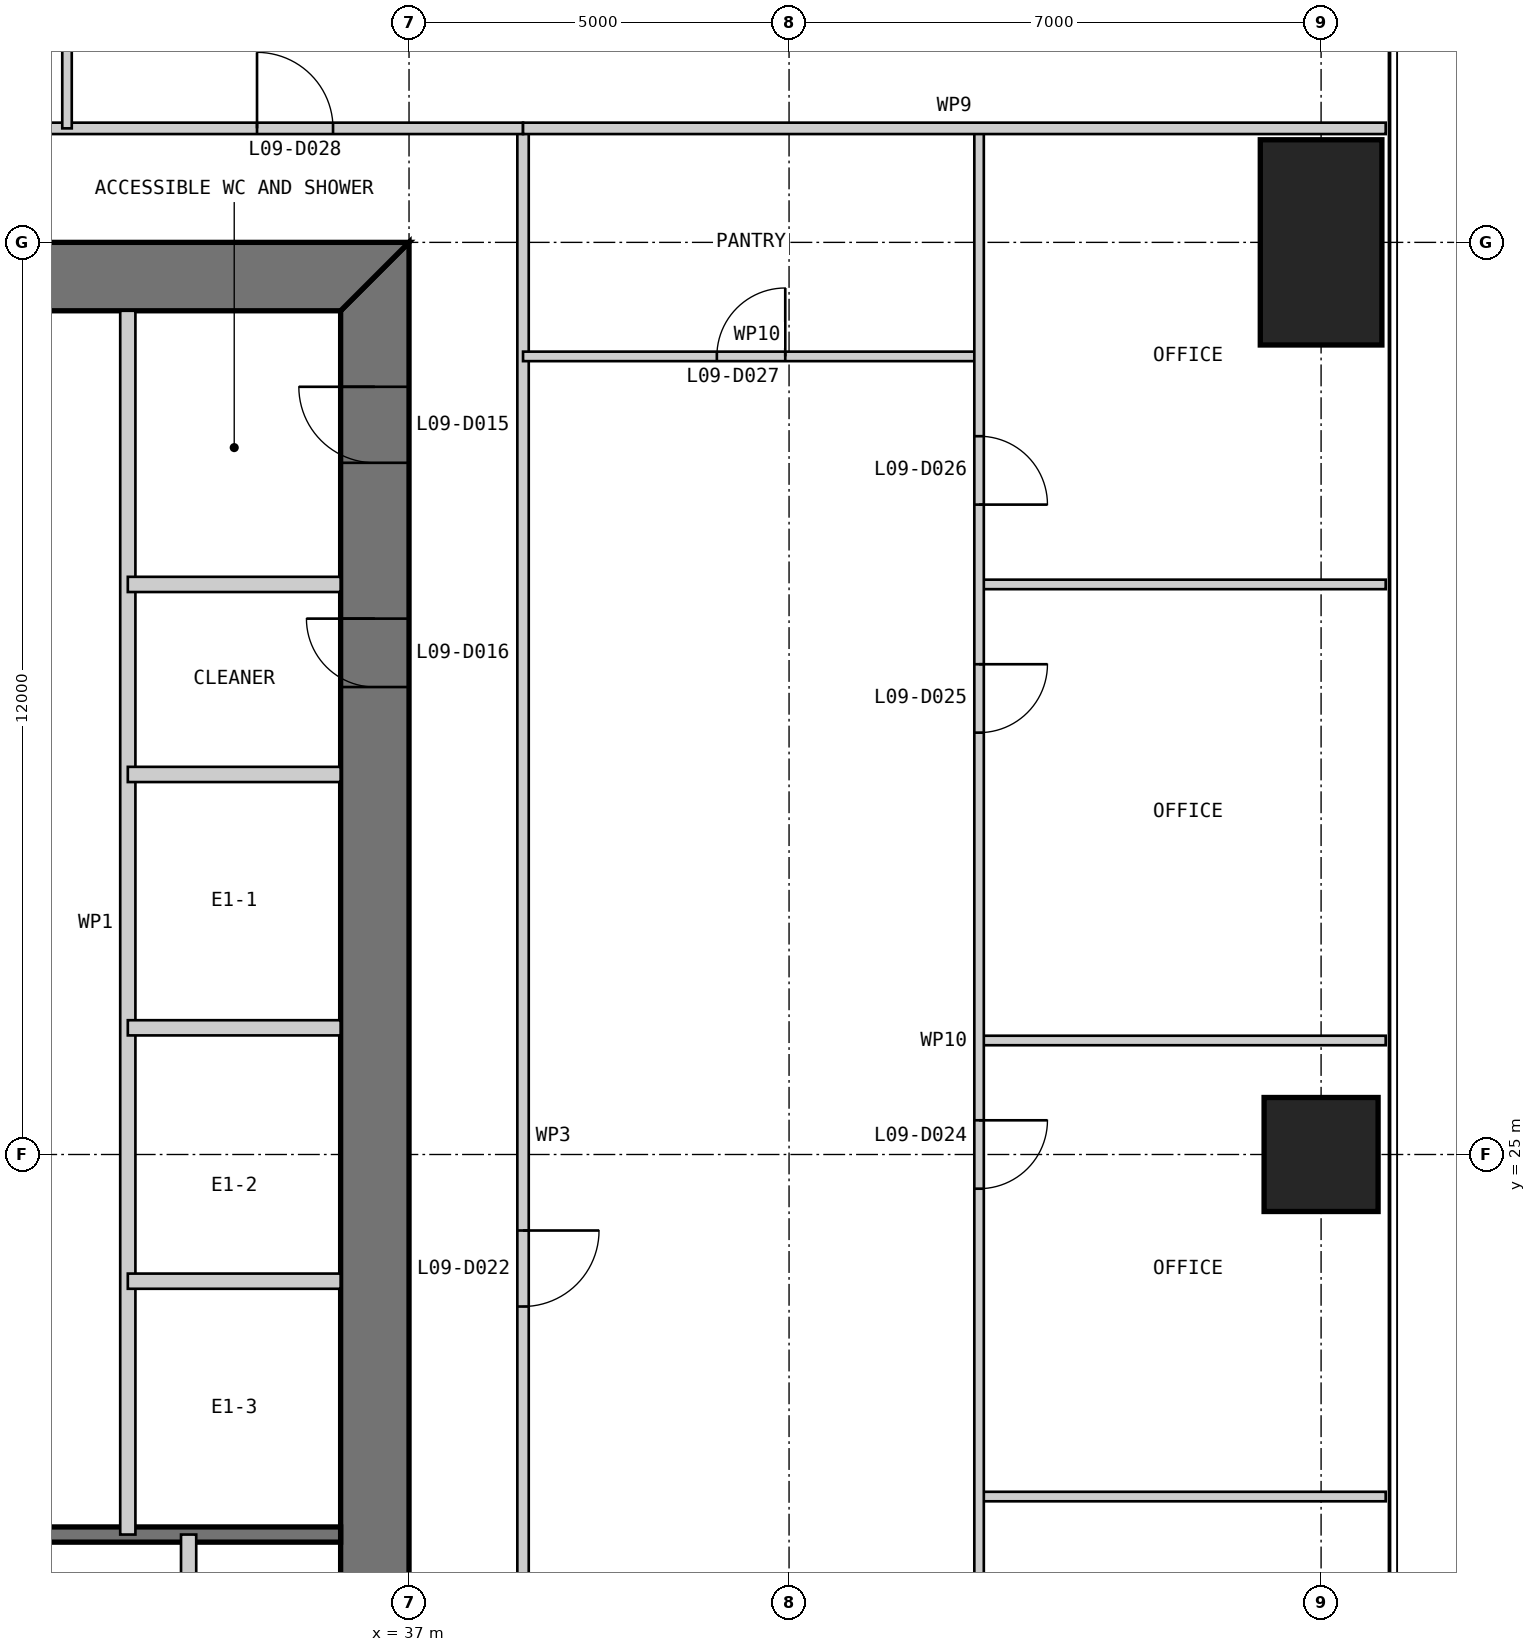
"""IFC4 building model, lengths in metres.
Left out: names, types, materials, properties, quantities, classifications, styles, units other than length and angle.
Written with IfcOpenShell. Run it as: python <this file> out.ifc"""

import sys

from ifc_helpers import new_model, si_unit, direction, frame, frame_2d, origin, origin_2d, place, context, subcontext, project, spatial, polyline, rectangle, outline, extrude, element, fill, save


model = new_model("IFC4")
c1 = context("Model", 3, precision=1e-05, world=origin(), true_north=direction((0.0, 1.0)))
c2 = subcontext(c1, "Body", "Model", "MODEL_VIEW")
j1 = project(units=[si_unit("LENGTHUNIT", "METRE"), si_unit("PLANEANGLEUNIT", "RADIAN")], contexts=[c1])
p1 = place(None, origin())
s1 = spatial("IfcSite", under=j1, at=p1, CompositionType="ELEMENT")
p2 = place(p1, origin())
s2 = spatial("IfcBuilding", under=s1, at=p2, CompositionType="ELEMENT")
p3 = place(p2, frame((0.0, 0.0, 43.0)))
s3 = spatial("IfcBuildingStorey", under=s2, at=p3, CompositionType="ELEMENT", Elevation=43.0)
p4 = place(p3, frame((49.0, 25.0, 0.0), z_axis=(0.0, 0.0, 1.0), x_axis=(1.0, 0.0, 0.0)))
e1 = element("IfcColumn", 1, at=p4, inside=s3, PredefinedType="COLUMN", context=c2, shape_type="SweptSolid", body=[
    extrude(rectangle(XDim=1.5, YDim=1.5, at=origin_2d()), origin(), (0.0, 0.0, 1.0), 4.0),
])
p5 = place(p3, frame((49.0, 37.0, 0.0), z_axis=(0.0, 0.0, 1.0), x_axis=(1.0, 0.0, 0.0)))
e2 = element("IfcColumn", 2, at=p5, inside=s3, PredefinedType="COLUMN", context=c2, shape_type="SweptSolid", body=[
    extrude(rectangle(XDim=1.6, YDim=2.7, at=origin_2d()), origin(), (0.0, 0.0, 1.0), 4.0),
])
p6 = place(p3, frame((36.55, 13.9, 0.0), z_axis=(0.0, 0.0, 1.0), x_axis=(0.0, 1.0, 0.0)))
e3 = element("IfcWall", 3, at=p6, inside=s3, PredefinedType="SHEAR", context=c2, shape_type="SweptSolid", body=[
    extrude(outline(polyline([(-0.9, -0.45), (23.1, -0.45), (22.2, 0.45), (0.0, 0.45), (-0.9, -0.45)])), origin(), (0.0, 0.0, 1.0), 4.0),
])
p7 = place(p6, frame((20.2, 0.0, 0.0)))
e4 = element("IfcOpeningElement", 4, at=p7, cuts=e3, PredefinedType="OPENING", context=c2, shape_type="SweptSolid", body=[
    extrude(rectangle(XDim=1.0, YDim=2.2, at=frame_2d((0.5, 1.1))), frame((0.0, 0.46, 0.0), z_axis=(0.0, -1.0, 0.0), x_axis=(1.0, 0.0, 0.0)), (0.0, 0.0, 1.0), 0.92),
])
p8 = place(p6, frame((17.25, 0.0, 0.0)))
e5 = element("IfcOpeningElement", 5, at=p8, cuts=e3, PredefinedType="OPENING", context=c2, shape_type="SweptSolid", body=[
    extrude(rectangle(XDim=0.9, YDim=2.2, at=frame_2d((0.45, 1.1))), frame((0.0, 0.46, 0.0), z_axis=(0.0, -1.0, 0.0), x_axis=(1.0, 0.0, 0.0)), (0.0, 0.0, 1.0), 0.92),
])
p9 = place(p3, frame((37.0, 36.55, 0.0), z_axis=(0.0, 0.0, 1.0), x_axis=(-1.0, 0.0, 0.0)))
e6 = element("IfcWall", 6, at=p9, inside=s3, PredefinedType="SHEAR", context=c2, shape_type="SweptSolid", body=[
    extrude(outline(polyline([(0.0, -0.45), (24.0, -0.45), (23.1, 0.45), (0.9, 0.45), (0.0, -0.45)])), origin(), (0.0, 0.0, 1.0), 4.0),
])
p10 = place(p9, frame((4.9, 0.0, 0.0)))
e7 = element("IfcOpeningElement", 7, at=p10, cuts=e6, PredefinedType="OPENING", context=c2, shape_type="SweptSolid", body=[
    extrude(rectangle(XDim=1.0, YDim=2.2, at=frame_2d((0.5, 1.1))), frame((0.0, 0.46, 0.0), z_axis=(0.0, -1.0, 0.0), x_axis=(1.0, 0.0, 0.0)), (0.0, 0.0, 1.0), 0.92),
])
p11 = place(p9, frame((8.9, 0.0, 0.0)))
e8 = element("IfcOpeningElement", 8, at=p11, cuts=e6, PredefinedType="OPENING", context=c2, shape_type="SweptSolid", body=[
    extrude(rectangle(XDim=1.1, YDim=2.2, at=frame_2d((0.55, 1.1))), frame((0.0, 0.46, 0.0), z_axis=(0.0, -1.0, 0.0), x_axis=(1.0, 0.0, 0.0)), (0.0, 0.0, 1.0), 0.92),
])
p12 = place(p9, frame((15.05, 0.0, 0.0)))
e9 = element("IfcOpeningElement", 9, at=p12, cuts=e6, PredefinedType="OPENING", context=c2, shape_type="SweptSolid", body=[
    extrude(rectangle(XDim=0.9, YDim=2.2, at=frame_2d((0.45, 1.1))), frame((0.0, 0.46, 0.0), z_axis=(0.0, -1.0, 0.0), x_axis=(1.0, 0.0, 0.0)), (0.0, 0.0, 1.0), 0.92),
])
p13 = place(p9, frame((17.9, 0.0, 0.0)))
e10 = element("IfcOpeningElement", 10, at=p13, cuts=e6, PredefinedType="OPENING", context=c2, shape_type="SweptSolid", body=[
    extrude(rectangle(XDim=1.0, YDim=2.2, at=frame_2d((0.5, 1.1))), frame((0.0, 0.46, 0.0), z_axis=(0.0, -1.0, 0.0), x_axis=(1.0, 0.0, 0.0)), (0.0, 0.0, 1.0), 0.92),
])
p14 = place(p9, frame((21.4, 0.0, 0.0)))
e11 = element("IfcOpeningElement", 11, at=p14, cuts=e6, PredefinedType="OPENING", context=c2, shape_type="SweptSolid", body=[
    extrude(rectangle(XDim=1.0, YDim=2.2, at=frame_2d((0.5, 1.1))), frame((0.0, 0.46, 0.0), z_axis=(0.0, -1.0, 0.0), x_axis=(1.0, 0.0, 0.0)), (0.0, 0.0, 1.0), 0.92),
])
p15 = place(p3, frame((20.3, 20.0, 0.0), z_axis=(0.0, 0.0, 1.0), x_axis=(1.0, 0.0, 0.0)))
e12 = element("IfcWall", 12, at=p15, inside=s3, PredefinedType="SOLIDWALL", context=c2, shape_type="SweptSolid", body=[
    extrude(rectangle(XDim=15.8, YDim=0.2, at=frame_2d((7.9, 0.0))), origin(), (0.0, 0.0, 1.0), 3.8),
])
p16 = place(p3, frame((34.1, 13.9, 0.0), z_axis=(0.0, 0.0, 1.0), x_axis=(0.0, 1.0, 0.0)))
e13 = element("IfcWall", 13, at=p16, inside=s3, PredefinedType="PARTITIONING", context=c2, shape_type="SweptSolid", body=[
    extrude(rectangle(XDim=6.1, YDim=0.2, at=frame_2d((3.05, 0.0))), origin(), (0.0, 0.0, 1.0), 3.8),
])
p17 = place(p3, frame((33.3, 36.1, 0.0), z_axis=(0.0, 0.0, 1.0), x_axis=(0.0, -1.0, 0.0)))
e14 = element("IfcWall", 14, at=p17, inside=s3, PredefinedType="PARTITIONING", context=c2, shape_type="SweptSolid", body=[
    extrude(rectangle(XDim=16.1, YDim=0.2, at=frame_2d((8.05, 0.0))), origin(), (0.0, 0.0, 1.0), 3.8),
])
for number, where, z_axis, x_axis in (
    (15, (36.1, 30.0, 0.0), (0.0, 0.0, 1.0), (-1.0, 0.0, 0.0)),
    (16, (36.1, 26.667, 0.0), (0.0, 0.0, 1.0), (-1.0, 0.0, 0.0)),
    (17, (36.1, 23.333, 0.0), (0.0, 0.0, 1.0), (-1.0, 0.0, 0.0)),
    (18, (36.1, 32.5, 0.0), (0.0, 0.0, 1.0), (-1.0, 0.0, 0.0)),
):
    element("IfcWall", number, at=place(p3, frame(where, z_axis=z_axis, x_axis=x_axis)), inside=s3, PredefinedType="PARTITIONING", context=c2, shape_type="SweptSolid", body=[
        extrude(rectangle(XDim=2.8, YDim=0.2, at=frame_2d((1.4, 0.0))), origin(), (0.0, 0.0, 1.0), 3.8),
    ])
p18 = place(p3, frame((38.5, 11.5, 0.0), z_axis=(0.0, 0.0, 1.0), x_axis=(0.0, 1.0, 0.0)))
e19 = element("IfcWall", 19, at=p18, inside=s3, PredefinedType="PARTITIONING", context=c2, shape_type="SweptSolid", body=[
    extrude(rectangle(XDim=27.0, YDim=0.15, at=frame_2d((13.5, 0.0))), origin(), (0.0, 0.0, 1.0), 3.85),
])
p19 = place(p18, frame((11.5, 0.0, 0.0)))
e20 = element("IfcOpeningElement", 20, at=p19, cuts=e19, PredefinedType="OPENING", context=c2, shape_type="SweptSolid", body=[
    extrude(rectangle(XDim=1.0, YDim=2.2, at=frame_2d((0.5, 1.1))), frame((0.0, 0.085, 0.0), z_axis=(0.0, -1.0, 0.0), x_axis=(1.0, 0.0, 0.0)), (0.0, 0.0, 1.0), 0.17),
])
for number, where, z_axis, x_axis in (
    (21, (49.85, 20.5, 0.0), (0.0, 0.0, 1.0), (-1.0, 0.0, 0.0)),
    (22, (49.85, 26.5, 0.0), (0.0, 0.0, 1.0), (-1.0, 0.0, 0.0)),
    (23, (49.85, 32.5, 0.0), (0.0, 0.0, 1.0), (-1.0, 0.0, 0.0)),
):
    element("IfcWall", number, at=place(p3, frame(where, z_axis=z_axis, x_axis=x_axis)), inside=s3, PredefinedType="PARTITIONING", context=c2, shape_type="SweptSolid", body=[
        extrude(rectangle(XDim=5.35, YDim=0.125, at=frame_2d((2.675, 0.0))), origin(), (0.0, 0.0, 1.0), 3.85),
    ])
p20 = place(p3, frame((44.5, 35.5, 0.0), z_axis=(0.0, 0.0, 1.0), x_axis=(-1.0, 0.0, 0.0)))
e24 = element("IfcWall", 24, at=p20, inside=s3, PredefinedType="PARTITIONING", context=c2, shape_type="SweptSolid", body=[
    extrude(rectangle(XDim=6.0, YDim=0.125, at=frame_2d((3.0, 0.0))), origin(), (0.0, 0.0, 1.0), 3.85),
])
p21 = place(p20, frame((2.55, 0.0, 0.0)))
e25 = element("IfcOpeningElement", 25, at=p21, cuts=e24, PredefinedType="OPENING", context=c2, shape_type="SweptSolid", body=[
    extrude(rectangle(XDim=0.9, YDim=2.2, at=frame_2d((0.45, 1.1))), frame((0.0, 0.073, 0.0), z_axis=(0.0, -1.0, 0.0), x_axis=(1.0, 0.0, 0.0)), (0.0, 0.0, 1.0), 0.145),
])
p22 = place(p3, frame((44.5, 14.5, 0.0), z_axis=(0.0, 0.0, 1.0), x_axis=(0.0, 1.0, 0.0)))
e26 = element("IfcWall", 26, at=p22, inside=s3, PredefinedType="PARTITIONING", context=c2, shape_type="SweptSolid", body=[
    extrude(rectangle(XDim=24.0, YDim=0.125, at=frame_2d((12.0, 0.0))), origin(), (0.0, 0.0, 1.0), 3.85),
])
p23 = place(p22, frame((10.05, 0.0, 0.0)))
e27 = element("IfcOpeningElement", 27, at=p23, cuts=e26, PredefinedType="OPENING", context=c2, shape_type="SweptSolid", body=[
    extrude(rectangle(XDim=0.9, YDim=2.2, at=frame_2d((0.45, 1.1))), frame((0.0, 0.073, 0.0), z_axis=(0.0, -1.0, 0.0), x_axis=(1.0, 0.0, 0.0)), (0.0, 0.0, 1.0), 0.145),
])
p24 = place(p22, frame((16.05, 0.0, 0.0)))
e28 = element("IfcOpeningElement", 28, at=p24, cuts=e26, PredefinedType="OPENING", context=c2, shape_type="SweptSolid", body=[
    extrude(rectangle(XDim=0.9, YDim=2.2, at=frame_2d((0.45, 1.1))), frame((0.0, 0.073, 0.0), z_axis=(0.0, -1.0, 0.0), x_axis=(1.0, 0.0, 0.0)), (0.0, 0.0, 1.0), 0.145),
])
p25 = place(p22, frame((19.05, 0.0, 0.0)))
e29 = element("IfcOpeningElement", 29, at=p25, cuts=e26, PredefinedType="OPENING", context=c2, shape_type="SweptSolid", body=[
    extrude(rectangle(XDim=0.9, YDim=2.2, at=frame_2d((0.45, 1.1))), frame((0.0, 0.073, 0.0), z_axis=(0.0, -1.0, 0.0), x_axis=(1.0, 0.0, 0.0)), (0.0, 0.0, 1.0), 0.145),
])
p26 = place(p3, frame((38.5, 38.5, 0.0), z_axis=(0.0, 0.0, 1.0), x_axis=(-1.0, 0.0, 0.0)))
e30 = element("IfcWall", 30, at=p26, inside=s3, PredefinedType="PARTITIONING", context=c2, shape_type="SweptSolid", body=[
    extrude(rectangle(XDim=27.0, YDim=0.15, at=frame_2d((13.5, 0.0))), origin(), (0.0, 0.0, 1.0), 3.85),
])
p27 = place(p26, frame((2.5, 0.0, 0.0)))
e31 = element("IfcOpeningElement", 31, at=p27, cuts=e30, PredefinedType="OPENING", context=c2, shape_type="SweptSolid", body=[
    extrude(rectangle(XDim=1.0, YDim=2.2, at=frame_2d((0.5, 1.1))), frame((0.0, 0.085, 0.0), z_axis=(0.0, -1.0, 0.0), x_axis=(1.0, 0.0, 0.0)), (0.0, 0.0, 1.0), 0.17),
])
p28 = place(p26, frame((13.0, 0.0, 0.0)))
e32 = element("IfcOpeningElement", 32, at=p28, cuts=e30, PredefinedType="OPENING", context=c2, shape_type="SweptSolid", body=[
    extrude(rectangle(XDim=1.0, YDim=2.2, at=frame_2d((0.5, 1.1))), frame((0.0, 0.085, 0.0), z_axis=(0.0, -1.0, 0.0), x_axis=(1.0, 0.0, 0.0)), (0.0, 0.0, 1.0), 0.17),
])
p29 = place(p26, frame((23.5, 0.0, 0.0)))
e33 = element("IfcOpeningElement", 33, at=p29, cuts=e30, PredefinedType="OPENING", context=c2, shape_type="SweptSolid", body=[
    extrude(rectangle(XDim=1.0, YDim=2.2, at=frame_2d((0.5, 1.1))), frame((0.0, 0.085, 0.0), z_axis=(0.0, -1.0, 0.0), x_axis=(1.0, 0.0, 0.0)), (0.0, 0.0, 1.0), 0.17),
])
p30 = place(p3, frame((49.85, 38.5, 0.0), z_axis=(0.0, 0.0, 1.0), x_axis=(-1.0, 0.0, 0.0)))
e34 = element("IfcWall", 34, at=p30, inside=s3, PredefinedType="PARTITIONING", context=c2, shape_type="SweptSolid", body=[
    extrude(rectangle(XDim=11.35, YDim=0.15, at=frame_2d((5.675, 0.0))), origin(), (0.0, 0.0, 1.0), 3.85),
])
p31 = place(p3, frame((32.5, 44.5, 0.0), z_axis=(0.0, 0.0, 1.0), x_axis=(0.0, -1.0, 0.0)))
e35 = element("IfcWall", 35, at=p31, inside=s3, PredefinedType="PARTITIONING", context=c2, shape_type="SweptSolid", body=[
    extrude(rectangle(XDim=6.0, YDim=0.125, at=frame_2d((3.0, 0.0))), origin(), (0.0, 0.0, 1.0), 3.85),
])
p32 = place(p31, frame((2.55, 0.0, 0.0)))
e36 = element("IfcOpeningElement", 36, at=p32, cuts=e35, PredefinedType="OPENING", context=c2, shape_type="SweptSolid", body=[
    extrude(rectangle(XDim=0.9, YDim=2.2, at=frame_2d((0.45, 1.1))), frame((0.0, 0.073, 0.0), z_axis=(0.0, -1.0, 0.0), x_axis=(1.0, 0.0, 0.0)), (0.0, 0.0, 1.0), 0.145),
])
p33 = place(p7, origin())
e37 = element("IfcDoor", 37, at=p33, inside=s3, OperationType="SINGLE_SWING_RIGHT", PredefinedType="DOOR", context=c2, shape_type="SweptSolid", body=[
    extrude(rectangle(XDim=1.0, YDim=2.2, at=frame_2d((0.5, 1.1))), frame((0.0, 0.025, 0.0), z_axis=(0.0, -1.0, 0.0), x_axis=(1.0, 0.0, 0.0)), (0.0, 0.0, 1.0), 0.05),
    extrude(outline(polyline([(0.0, 0.0), (0.04, 0.0), (0.04, 2.16), (0.96, 2.16), (0.96, 0.0), (1.0, 0.0), (1.0, 2.2), (0.0, 2.2), (0.0, 0.0)])), frame((0.0, 0.3, 0.0), z_axis=(0.0, -1.0, 0.0), x_axis=(1.0, 0.0, 0.0)), (0.0, 0.0, 1.0), 0.6),
])
fill(e4, e37)
p34 = place(p8, origin())
e38 = element("IfcDoor", 38, at=p34, inside=s3, OperationType="SINGLE_SWING_RIGHT", PredefinedType="DOOR", context=c2, shape_type="SweptSolid", body=[
    extrude(rectangle(XDim=0.9, YDim=2.2, at=frame_2d((0.45, 1.1))), frame((0.0, 0.025, 0.0), z_axis=(0.0, -1.0, 0.0), x_axis=(1.0, 0.0, 0.0)), (0.0, 0.0, 1.0), 0.05),
    extrude(outline(polyline([(0.0, 0.0), (0.04, 0.0), (0.04, 2.16), (0.86, 2.16), (0.86, 0.0), (0.9, 0.0), (0.9, 2.2), (0.0, 2.2), (0.0, 0.0)])), frame((0.0, 0.3, 0.0), z_axis=(0.0, -1.0, 0.0), x_axis=(1.0, 0.0, 0.0)), (0.0, 0.0, 1.0), 0.6),
])
fill(e5, e38)
p35 = place(p19, frame((1.0, 0.0, 0.0), z_axis=(0.0, 0.0, 1.0), x_axis=(-1.0, 0.0, 0.0)))
e39 = element("IfcDoor", 39, at=p35, inside=s3, OperationType="SINGLE_SWING_LEFT", PredefinedType="DOOR", context=c2, shape_type="SweptSolid", body=[
    extrude(rectangle(XDim=1.0, YDim=2.2, at=frame_2d((0.5, 1.1))), frame((0.0, 0.025, 0.0), z_axis=(0.0, -1.0, 0.0), x_axis=(1.0, 0.0, 0.0)), (0.0, 0.0, 1.0), 0.05),
])
fill(e20, e39)
p36 = place(p23, frame((0.9, 0.0, 0.0), z_axis=(0.0, 0.0, 1.0), x_axis=(-1.0, 0.0, 0.0)))
e40 = element("IfcDoor", 40, at=p36, inside=s3, OperationType="SINGLE_SWING_LEFT", PredefinedType="DOOR", context=c2, shape_type="SweptSolid", body=[
    extrude(rectangle(XDim=0.9, YDim=2.2, at=frame_2d((0.45, 1.1))), frame((0.0, 0.025, 0.0), z_axis=(0.0, -1.0, 0.0), x_axis=(1.0, 0.0, 0.0)), (0.0, 0.0, 1.0), 0.05),
])
fill(e27, e40)
p37 = place(p24, frame((0.9, 0.0, 0.0), z_axis=(0.0, 0.0, 1.0), x_axis=(-1.0, 0.0, 0.0)))
e41 = element("IfcDoor", 41, at=p37, inside=s3, OperationType="SINGLE_SWING_LEFT", PredefinedType="DOOR", context=c2, shape_type="SweptSolid", body=[
    extrude(rectangle(XDim=0.9, YDim=2.2, at=frame_2d((0.45, 1.1))), frame((0.0, 0.025, 0.0), z_axis=(0.0, -1.0, 0.0), x_axis=(1.0, 0.0, 0.0)), (0.0, 0.0, 1.0), 0.05),
])
fill(e28, e41)
p38 = place(p25, frame((0.9, 0.0, 0.0), z_axis=(0.0, 0.0, 1.0), x_axis=(-1.0, 0.0, 0.0)))
e42 = element("IfcDoor", 42, at=p38, inside=s3, OperationType="SINGLE_SWING_RIGHT", PredefinedType="DOOR", context=c2, shape_type="SweptSolid", body=[
    extrude(rectangle(XDim=0.9, YDim=2.2, at=frame_2d((0.45, 1.1))), frame((0.0, 0.025, 0.0), z_axis=(0.0, -1.0, 0.0), x_axis=(1.0, 0.0, 0.0)), (0.0, 0.0, 1.0), 0.05),
])
fill(e29, e42)
p39 = place(p21, frame((0.9, 0.0, 0.0), z_axis=(0.0, 0.0, 1.0), x_axis=(-1.0, 0.0, 0.0)))
e43 = element("IfcDoor", 43, at=p39, inside=s3, OperationType="SINGLE_SWING_RIGHT", PredefinedType="DOOR", context=c2, shape_type="SweptSolid", body=[
    extrude(rectangle(XDim=0.9, YDim=2.2, at=frame_2d((0.45, 1.1))), frame((0.0, 0.025, 0.0), z_axis=(0.0, -1.0, 0.0), x_axis=(1.0, 0.0, 0.0)), (0.0, 0.0, 1.0), 0.05),
])
fill(e25, e43)
p40 = place(p27, frame((1.0, 0.0, 0.0), z_axis=(0.0, 0.0, 1.0), x_axis=(-1.0, 0.0, 0.0)))
e44 = element("IfcDoor", 44, at=p40, inside=s3, OperationType="SINGLE_SWING_LEFT", PredefinedType="DOOR", context=c2, shape_type="SweptSolid", body=[
    extrude(rectangle(XDim=1.0, YDim=2.2, at=frame_2d((0.5, 1.1))), frame((0.0, 0.025, 0.0), z_axis=(0.0, -1.0, 0.0), x_axis=(1.0, 0.0, 0.0)), (0.0, 0.0, 1.0), 0.05),
])
fill(e31, e44)
save(model, sys.argv[1])
